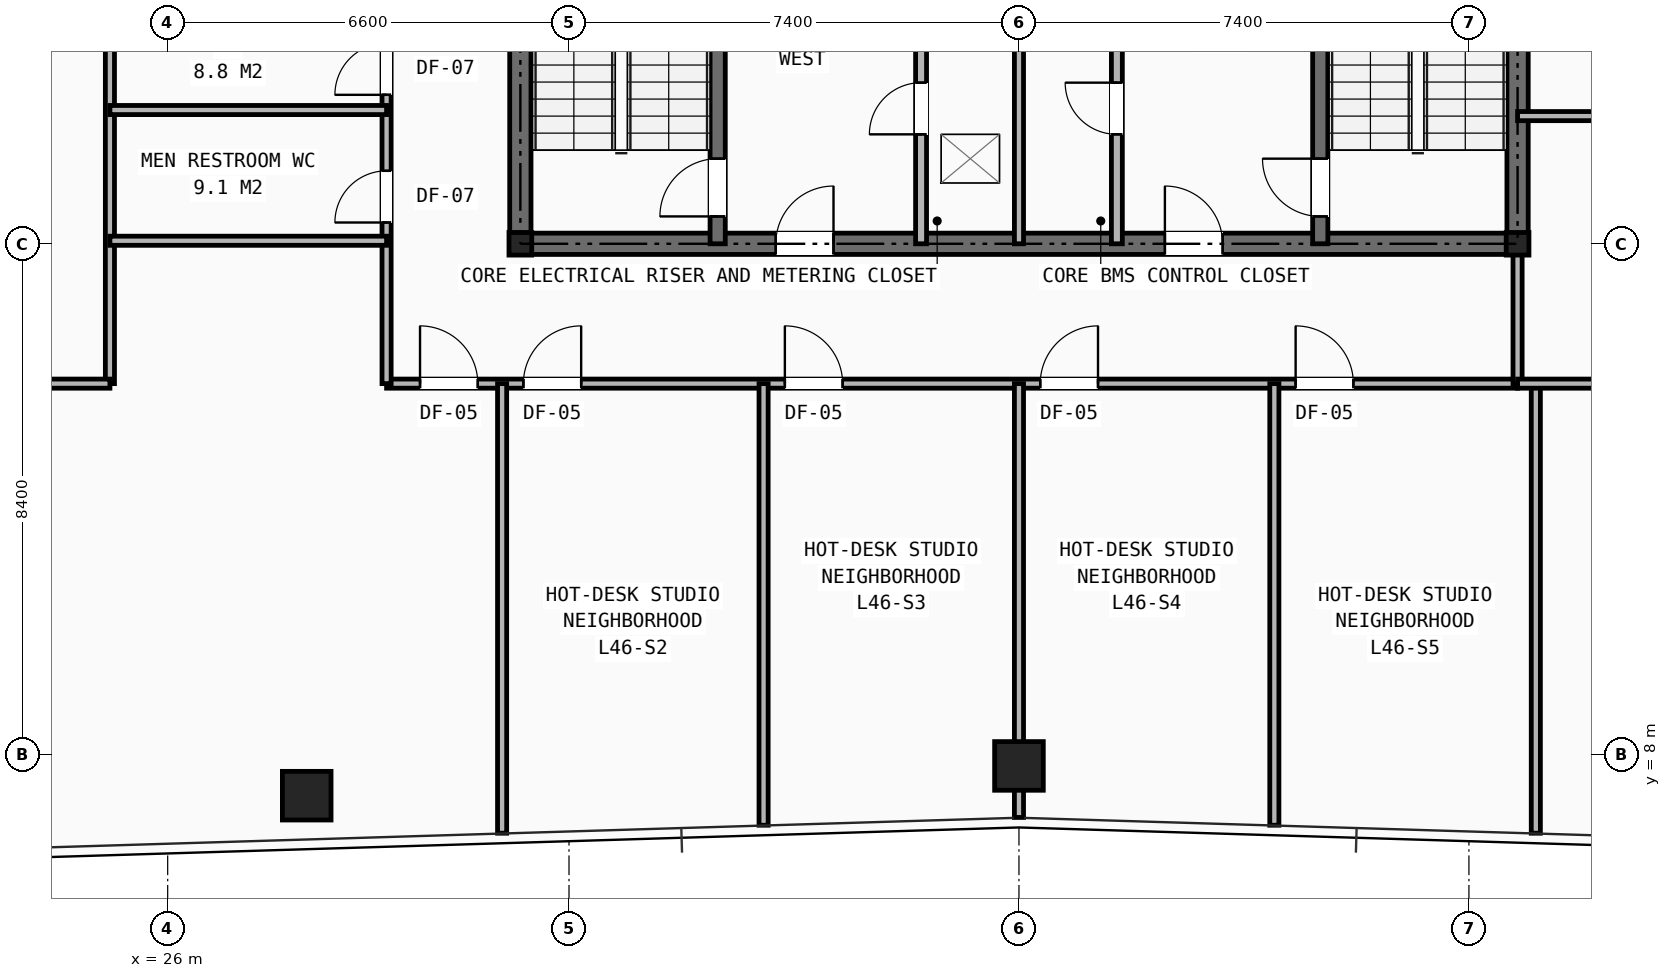
"""IFC4 building model, lengths in metres.
Left out: names, types, materials, properties, quantities, classifications, styles, units other than length and angle.
Written with IfcOpenShell. Run it as: python <this file> out.ifc"""

import sys

from ifc_helpers import new_model, si_unit, direction, frame, frame_2d, origin, origin_2d, place, context, subcontext, project, spatial, rectangle, hollow_rectangle, i_section, extrude, element, fill, save


model = new_model("IFC4")
c1 = context("Model", 3, precision=1e-05, world=origin(), true_north=direction((0.0, 1.0)))
c2 = subcontext(c1, "Body", "Model", "MODEL_VIEW")
j1 = project(units=[si_unit("LENGTHUNIT", "METRE"), si_unit("PLANEANGLEUNIT", "RADIAN")], contexts=[c1])
p1 = place(None, origin())
s1 = spatial("IfcSite", under=j1, at=p1, CompositionType="ELEMENT")
p2 = place(p1, origin())
s2 = spatial("IfcBuilding", under=s1, at=p2, CompositionType="ELEMENT")
p3 = place(p2, frame((0.0, 0.0, 162.0)))
s3 = spatial("IfcBuildingStorey", under=s2, at=p3, CompositionType="ELEMENT", Elevation=162.0)
for number, where, z_axis, x_axis in (
    (1, (31.8, 16.4, 0.0), (0.0, 0.0, 1.0), (1.0, 0.0, 0.0)),
    (2, (48.2, 16.4, 0.0), (0.0, 0.0, 1.0), (1.0, 0.0, 0.0)),
):
    element("IfcColumn", number, at=place(p3, frame(where, z_axis=z_axis, x_axis=x_axis)), inside=s3, PredefinedType="COLUMN", context=c2, shape_type="SweptSolid", body=[
        extrude(i_section(OverallWidth=0.374, OverallDepth=0.372, WebThickness=0.016, FlangeThickness=0.026, at=origin_2d()), origin(), (0.0, 0.0, 1.0), 3.45),
    ])
for number, where, z_axis, x_axis in (
    (3, (28.287, 7.323, 0.0), (0.0, 0.0, 1.0), (1.0, 0.0, 0.0)),
    (4, (40.0, 7.812, 0.0), (0.0, 0.0, 1.0), (1.0, 0.0, 0.0)),
):
    element("IfcColumn", number, at=place(p3, frame(where, z_axis=z_axis, x_axis=x_axis)), inside=s3, PredefinedType="COLUMN", context=c2, shape_type="SweptSolid", body=[
        extrude(hollow_rectangle(XDim=0.8, YDim=0.8, WallThickness=0.055, at=origin_2d()), origin(), (0.0, 0.0, 1.0), 3.45),
    ])
p4 = place(p3, frame((31.8, 16.4, 0.0), z_axis=(0.0, 0.0, 1.0), x_axis=(1.0, 0.0, 0.0)))
e5 = element("IfcWall", 5, at=p4, inside=s3, PredefinedType="SHEAR", context=c2, shape_type="SweptSolid", body=[
    extrude(rectangle(XDim=16.4, YDim=0.35, at=frame_2d((8.2, 0.0))), origin(), (0.0, 0.0, 1.0), 3.21),
])
p5 = place(p4, frame((4.2, 0.0, 0.0)))
e6 = element("IfcOpeningElement", 6, at=p5, cuts=e5, PredefinedType="OPENING", context=c2, shape_type="SweptSolid", body=[
    extrude(rectangle(XDim=0.95, YDim=2.1, at=frame_2d((0.475, 1.05))), frame((0.0, 0.185, 0.0), z_axis=(0.0, -1.0, 0.0), x_axis=(1.0, 0.0, 0.0)), (0.0, 0.0, 1.0), 0.37),
])
p6 = place(p4, frame((10.6, 0.0, 0.0)))
e7 = element("IfcOpeningElement", 7, at=p6, cuts=e5, PredefinedType="OPENING", context=c2, shape_type="SweptSolid", body=[
    extrude(rectangle(XDim=0.95, YDim=2.1, at=frame_2d((0.475, 1.05))), frame((0.0, 0.185, 0.0), z_axis=(0.0, -1.0, 0.0), x_axis=(1.0, 0.0, 0.0)), (0.0, 0.0, 1.0), 0.37),
])
p7 = place(p3, frame((31.8, 16.4, 0.0), z_axis=(0.0, 0.0, 1.0), x_axis=(0.0, 1.0, 0.0)))
e8 = element("IfcWall", 8, at=p7, inside=s3, PredefinedType="SHEAR", context=c2, shape_type="SweptSolid", body=[
    extrude(rectangle(XDim=14.8, YDim=0.35, at=frame_2d((7.4, 0.0))), origin(), (0.0, 0.0, 1.0), 3.21),
])
p8 = place(p7, frame((11.0, 0.0, 0.0)))
e9 = element("IfcOpeningElement", 9, at=p8, cuts=e8, PredefinedType="OPENING", context=c2, shape_type="SweptSolid", body=[
    extrude(rectangle(XDim=1.1, YDim=2.15, at=frame_2d((0.55, 1.075))), frame((0.0, 0.185, 0.0), z_axis=(0.0, -1.0, 0.0), x_axis=(1.0, 0.0, 0.0)), (0.0, 0.0, 1.0), 0.37),
])
p9 = place(p3, frame((48.2, 16.4, 0.0), z_axis=(0.0, 0.0, 1.0), x_axis=(0.0, 1.0, 0.0)))
e10 = element("IfcWall", 10, at=p9, inside=s3, PredefinedType="SHEAR", context=c2, shape_type="SweptSolid", body=[
    extrude(rectangle(XDim=14.8, YDim=0.35, at=frame_2d((7.4, 0.0))), origin(), (0.0, 0.0, 1.0), 3.21),
])
p10 = place(p9, frame((11.0, 0.0, 0.0)))
e11 = element("IfcOpeningElement", 11, at=p10, cuts=e10, PredefinedType="OPENING", context=c2, shape_type="SweptSolid", body=[
    extrude(rectangle(XDim=1.1, YDim=2.15, at=frame_2d((0.55, 1.075))), frame((0.0, 0.185, 0.0), z_axis=(0.0, -1.0, 0.0), x_axis=(1.0, 0.0, 0.0)), (0.0, 0.0, 1.0), 0.37),
])
p11 = place(p3, frame((35.045, 16.4, 0.0), z_axis=(0.0, 0.0, 1.0), x_axis=(0.0, 1.0, 0.0)))
e12 = element("IfcWall", 12, at=p11, inside=s3, PredefinedType="SHEAR", context=c2, shape_type="SweptSolid", body=[
    extrude(rectangle(XDim=8.4, YDim=0.25, at=frame_2d((4.2, 0.0))), origin(), (0.0, 0.0, 1.0), 3.21),
])
p12 = place(p11, frame((0.45, 0.0, 0.0)))
e13 = element("IfcOpeningElement", 13, at=p12, cuts=e12, PredefinedType="OPENING", context=c2, shape_type="SweptSolid", body=[
    extrude(rectangle(XDim=0.95, YDim=2.1, at=frame_2d((0.475, 1.05))), frame((0.0, 0.135, 0.0), z_axis=(0.0, -1.0, 0.0), x_axis=(1.0, 0.0, 0.0)), (0.0, 0.0, 1.0), 0.27),
])
p13 = place(p3, frame((44.955, 16.4, 0.0), z_axis=(0.0, 0.0, 1.0), x_axis=(0.0, 1.0, 0.0)))
e14 = element("IfcWall", 14, at=p13, inside=s3, PredefinedType="SHEAR", context=c2, shape_type="SweptSolid", body=[
    extrude(rectangle(XDim=8.4, YDim=0.25, at=frame_2d((4.2, 0.0))), origin(), (0.0, 0.0, 1.0), 3.21),
])
p14 = place(p13, frame((0.45, 0.0, 0.0)))
e15 = element("IfcOpeningElement", 15, at=p14, cuts=e14, PredefinedType="OPENING", context=c2, shape_type="SweptSolid", body=[
    extrude(rectangle(XDim=0.95, YDim=2.1, at=frame_2d((0.475, 1.05))), frame((0.0, 0.135, 0.0), z_axis=(0.0, -1.0, 0.0), x_axis=(1.0, 0.0, 0.0)), (0.0, 0.0, 1.0), 0.27),
])
p15 = place(p3, frame((38.39, 16.4, 0.0), z_axis=(0.0, 0.0, 1.0), x_axis=(0.0, 1.0, 0.0)))
e16 = element("IfcWall", 16, at=p15, inside=s3, PredefinedType="PARTITIONING", context=c2, shape_type="SweptSolid", body=[
    extrude(rectangle(XDim=8.4, YDim=0.18, at=frame_2d((4.2, 0.0))), origin(), (0.0, 0.0, 1.0), 2.665),
])
p16 = place(p15, frame((1.8, 0.0, 0.0)))
e17 = element("IfcOpeningElement", 17, at=p16, cuts=e16, PredefinedType="OPENING", context=c2, shape_type="SweptSolid", body=[
    extrude(rectangle(XDim=0.85, YDim=2.05, at=frame_2d((0.425, 1.025))), frame((0.0, 0.1, 0.0), z_axis=(0.0, -1.0, 0.0), x_axis=(1.0, 0.0, 0.0)), (0.0, 0.0, 1.0), 0.2),
])
p17 = place(p15, frame((4.35, 0.0, 0.0)))
e18 = element("IfcOpeningElement", 18, at=p17, cuts=e16, PredefinedType="OPENING", context=c2, shape_type="SweptSolid", body=[
    extrude(rectangle(XDim=0.95, YDim=2.1, at=frame_2d((0.475, 1.05))), frame((0.0, 0.1, 0.0), z_axis=(0.0, -1.0, 0.0), x_axis=(1.0, 0.0, 0.0)), (0.0, 0.0, 1.0), 0.2),
])
p18 = place(p3, frame((41.61, 16.4, 0.0), z_axis=(0.0, 0.0, 1.0), x_axis=(0.0, 1.0, 0.0)))
e19 = element("IfcWall", 19, at=p18, inside=s3, PredefinedType="PARTITIONING", context=c2, shape_type="SweptSolid", body=[
    extrude(rectangle(XDim=8.4, YDim=0.18, at=frame_2d((4.2, 0.0))), origin(), (0.0, 0.0, 1.0), 2.665),
])
p19 = place(p18, frame((1.8, 0.0, 0.0)))
e20 = element("IfcOpeningElement", 20, at=p19, cuts=e19, PredefinedType="OPENING", context=c2, shape_type="SweptSolid", body=[
    extrude(rectangle(XDim=0.85, YDim=2.05, at=frame_2d((0.425, 1.025))), frame((0.0, 0.1, 0.0), z_axis=(0.0, -1.0, 0.0), x_axis=(1.0, 0.0, 0.0)), (0.0, 0.0, 1.0), 0.2),
])
p20 = place(p3, frame((40.0, 16.4, 0.0), z_axis=(0.0, 0.0, 1.0), x_axis=(0.0, 1.0, 0.0)))
e21 = element("IfcWall", 21, at=p20, inside=s3, PredefinedType="PARTITIONING", context=c2, shape_type="SweptSolid", body=[
    extrude(rectangle(XDim=3.9, YDim=0.15, at=frame_2d((1.95, 0.0))), origin(), (0.0, 0.0, 1.0), 2.665),
])
p21 = place(p3, frame((29.6, 14.1, 0.0), z_axis=(0.0, 0.0, 1.0), x_axis=(1.0, 0.0, 0.0)))
e22 = element("IfcWall", 22, at=p21, inside=s3, PredefinedType="PARTITIONING", context=c2, shape_type="SweptSolid", body=[
    extrude(rectangle(XDim=18.6, YDim=0.15, at=frame_2d((9.3, 0.0))), origin(), (0.0, 0.0, 1.0), 2.252),
])
p22 = place(p21, frame((0.55, 0.0, 0.0)))
e23 = element("IfcOpeningElement", 23, at=p22, cuts=e22, PredefinedType="OPENING", context=c2, shape_type="SweptSolid", body=[
    extrude(rectangle(XDim=0.95, YDim=2.1, at=frame_2d((0.475, 1.05))), frame((0.0, 0.085, 0.0), z_axis=(0.0, -1.0, 0.0), x_axis=(1.0, 0.0, 0.0)), (0.0, 0.0, 1.0), 0.17),
])
p23 = place(p21, frame((2.25, 0.0, 0.0)))
e24 = element("IfcOpeningElement", 24, at=p23, cuts=e22, PredefinedType="OPENING", context=c2, shape_type="SweptSolid", body=[
    extrude(rectangle(XDim=0.95, YDim=2.1, at=frame_2d((0.475, 1.05))), frame((0.0, 0.085, 0.0), z_axis=(0.0, -1.0, 0.0), x_axis=(1.0, 0.0, 0.0)), (0.0, 0.0, 1.0), 0.17),
])
p24 = place(p21, frame((6.55, 0.0, 0.0)))
e25 = element("IfcOpeningElement", 25, at=p24, cuts=e22, PredefinedType="OPENING", context=c2, shape_type="SweptSolid", body=[
    extrude(rectangle(XDim=0.95, YDim=2.1, at=frame_2d((0.475, 1.05))), frame((0.0, 0.085, 0.0), z_axis=(0.0, -1.0, 0.0), x_axis=(1.0, 0.0, 0.0)), (0.0, 0.0, 1.0), 0.17),
])
p25 = place(p21, frame((10.75, 0.0, 0.0)))
e26 = element("IfcOpeningElement", 26, at=p25, cuts=e22, PredefinedType="OPENING", context=c2, shape_type="SweptSolid", body=[
    extrude(rectangle(XDim=0.95, YDim=2.1, at=frame_2d((0.475, 1.05))), frame((0.0, 0.085, 0.0), z_axis=(0.0, -1.0, 0.0), x_axis=(1.0, 0.0, 0.0)), (0.0, 0.0, 1.0), 0.17),
])
p26 = place(p21, frame((14.95, 0.0, 0.0)))
e27 = element("IfcOpeningElement", 27, at=p26, cuts=e22, PredefinedType="OPENING", context=c2, shape_type="SweptSolid", body=[
    extrude(rectangle(XDim=0.95, YDim=2.1, at=frame_2d((0.475, 1.05))), frame((0.0, 0.085, 0.0), z_axis=(0.0, -1.0, 0.0), x_axis=(1.0, 0.0, 0.0)), (0.0, 0.0, 1.0), 0.17),
])
p27 = place(p3, frame((48.2, 14.1, 0.0), z_axis=(0.0, 0.0, 1.0), x_axis=(0.0, 1.0, 0.0)))
e28 = element("IfcWall", 28, at=p27, inside=s3, PredefinedType="PARTITIONING", context=c2, shape_type="SweptSolid", body=[
    extrude(rectangle(XDim=2.3, YDim=0.15, at=frame_2d((1.15, 0.0))), origin(), (0.0, 0.0, 1.0), 2.665),
])
p28 = place(p3, frame((29.6, 14.1, 0.0), z_axis=(0.0, 0.0, 1.0), x_axis=(0.0, 1.0, 0.0)))
e29 = element("IfcWall", 29, at=p28, inside=s3, PredefinedType="PARTITIONING", context=c2, shape_type="SweptSolid", body=[
    extrude(rectangle(XDim=8.7, YDim=0.15, at=frame_2d((4.35, 0.0))), origin(), (0.0, 0.0, 1.0), 3.21),
])
p29 = place(p28, frame((2.65, 0.0, 0.0)))
e30 = element("IfcOpeningElement", 30, at=p29, cuts=e29, PredefinedType="OPENING", context=c2, shape_type="SweptSolid", body=[
    extrude(rectangle(XDim=0.85, YDim=2.05, at=frame_2d((0.425, 1.025))), frame((0.0, 0.085, 0.0), z_axis=(0.0, -1.0, 0.0), x_axis=(1.0, 0.0, 0.0)), (0.0, 0.0, 1.0), 0.17),
])
p30 = place(p28, frame((4.75, 0.0, 0.0)))
e31 = element("IfcOpeningElement", 31, at=p30, cuts=e29, PredefinedType="OPENING", context=c2, shape_type="SweptSolid", body=[
    extrude(rectangle(XDim=0.85, YDim=2.05, at=frame_2d((0.425, 1.025))), frame((0.0, 0.085, 0.0), z_axis=(0.0, -1.0, 0.0), x_axis=(1.0, 0.0, 0.0)), (0.0, 0.0, 1.0), 0.17),
])
p31 = place(p28, frame((6.85, 0.0, 0.0)))
e32 = element("IfcOpeningElement", 32, at=p31, cuts=e29, PredefinedType="OPENING", context=c2, shape_type="SweptSolid", body=[
    extrude(rectangle(XDim=0.85, YDim=2.05, at=frame_2d((0.425, 1.025))), frame((0.0, 0.085, 0.0), z_axis=(0.0, -1.0, 0.0), x_axis=(1.0, 0.0, 0.0)), (0.0, 0.0, 1.0), 0.17),
])
p32 = place(p3, frame((25.05, 14.1, 0.0), z_axis=(0.0, 0.0, 1.0), x_axis=(0.0, 1.0, 0.0)))
e33 = element("IfcWall", 33, at=p32, inside=s3, PredefinedType="PARTITIONING", context=c2, shape_type="SweptSolid", body=[
    extrude(rectangle(XDim=8.7, YDim=0.15, at=frame_2d((4.35, 0.0))), origin(), (0.0, 0.0, 1.0), 3.21),
])
for number, where, z_axis, x_axis in (
    (34, (25.05, 16.45, 0.0), (0.0, 0.0, 1.0), (1.0, 0.0, 0.0)),
    (35, (25.05, 18.6, 0.0), (0.0, 0.0, 1.0), (1.0, 0.0, 0.0)),
):
    element("IfcWall", number, at=place(p3, frame(where, z_axis=z_axis, x_axis=x_axis)), inside=s3, PredefinedType="PARTITIONING", context=c2, shape_type="SweptSolid", body=[
        extrude(rectangle(XDim=4.55, YDim=0.15, at=frame_2d((2.275, 0.0))), origin(), (0.0, 0.0, 1.0), 3.21),
    ])
p33 = place(p3, frame((31.5, 6.706, 0.0), z_axis=(0.0, 0.0, 1.0), x_axis=(0.0, 1.0, 0.0)))
e36 = element("IfcWall", 36, at=p33, inside=s3, PredefinedType="PARTITIONING", context=c2, shape_type="SweptSolid", body=[
    extrude(rectangle(XDim=7.394, YDim=0.15, at=frame_2d((3.697, 0.0))), origin(), (0.0, 0.0, 1.0), 2.589),
])
p34 = place(p3, frame((35.8, 6.837, 0.0), z_axis=(0.0, 0.0, 1.0), x_axis=(0.0, 1.0, 0.0)))
e37 = element("IfcWall", 37, at=p34, inside=s3, PredefinedType="PARTITIONING", context=c2, shape_type="SweptSolid", body=[
    extrude(rectangle(XDim=7.263, YDim=0.15, at=frame_2d((3.631, 0.0))), origin(), (0.0, 0.0, 1.0), 2.252),
])
p35 = place(p3, frame((40.0, 6.965, 0.0), z_axis=(0.0, 0.0, 1.0), x_axis=(0.0, 1.0, 0.0)))
e38 = element("IfcWall", 38, at=p35, inside=s3, PredefinedType="PARTITIONING", context=c2, shape_type="SweptSolid", body=[
    extrude(rectangle(XDim=7.135, YDim=0.15, at=frame_2d((3.567, 0.0))), origin(), (0.0, 0.0, 1.0), 2.252),
])
p36 = place(p3, frame((44.2, 6.837, 0.0), z_axis=(0.0, 0.0, 1.0), x_axis=(0.0, 1.0, 0.0)))
e39 = element("IfcWall", 39, at=p36, inside=s3, PredefinedType="PARTITIONING", context=c2, shape_type="SweptSolid", body=[
    extrude(rectangle(XDim=7.263, YDim=0.15, at=frame_2d((3.631, 0.0))), origin(), (0.0, 0.0, 1.0), 2.589),
])
p37 = place(p3, frame((48.5, 6.706, 0.0), z_axis=(0.0, 0.0, 1.0), x_axis=(0.0, 1.0, 0.0)))
e40 = element("IfcWall", 40, at=p37, inside=s3, PredefinedType="PARTITIONING", context=c2, shape_type="SweptSolid", body=[
    extrude(rectangle(XDim=7.394, YDim=0.15, at=frame_2d((3.697, 0.0))), origin(), (0.0, 0.0, 1.0), 2.589),
])
p38 = place(p3, frame((13.492, 14.1, 0.0), z_axis=(0.0, 0.0, 1.0), x_axis=(1.0, 0.0, 0.0)))
e41 = element("IfcWall", 41, at=p38, inside=s3, PredefinedType="PARTITIONING", context=c2, shape_type="SweptSolid", body=[
    extrude(rectangle(XDim=11.558, YDim=0.15, at=frame_2d((5.779, 0.0))), origin(), (0.0, 0.0, 1.0), 2.589),
])
p39 = place(p3, frame((48.2, 14.1, 0.0), z_axis=(0.0, 0.0, 1.0), x_axis=(1.0, 0.0, 0.0)))
e42 = element("IfcWall", 42, at=p39, inside=s3, PredefinedType="PARTITIONING", context=c2, shape_type="SweptSolid", body=[
    extrude(rectangle(XDim=18.308, YDim=0.15, at=frame_2d((9.154, 0.0))), origin(), (0.0, 0.0, 1.0), 2.589),
])
p40 = place(p3, frame((48.2, 18.5, 0.0), z_axis=(0.0, 0.0, 1.0), x_axis=(1.0, 0.0, 0.0)))
e43 = element("IfcWall", 43, at=p40, inside=s3, PredefinedType="PARTITIONING", context=c2, shape_type="SweptSolid", body=[
    extrude(rectangle(XDim=15.585, YDim=0.15, at=frame_2d((7.792, 0.0))), origin(), (0.0, 0.0, 1.0), 2.589),
])
p41 = place(p40, frame((1.4, 0.0, 0.0)))
e44 = element("IfcOpeningElement", 44, at=p41, cuts=e43, PredefinedType="OPENING", context=c2, shape_type="SweptSolid", body=[
    extrude(rectangle(XDim=0.95, YDim=2.1, at=frame_2d((0.475, 1.05))), frame((0.0, 0.085, 0.0), z_axis=(0.0, -1.0, 0.0), x_axis=(1.0, 0.0, 0.0)), (0.0, 0.0, 1.0), 0.17),
])
p42 = place(p16, origin())
e45 = element("IfcDoor", 45, at=p42, inside=s3, OperationType="SINGLE_SWING_LEFT", PredefinedType="DOOR", context=c2, shape_type="SweptSolid", body=[
    extrude(rectangle(XDim=0.85, YDim=2.05, at=frame_2d((0.425, 1.025))), frame((0.0, 0.025, 0.0), z_axis=(0.0, -1.0, 0.0), x_axis=(1.0, 0.0, 0.0)), (0.0, 0.0, 1.0), 0.05),
])
fill(e17, e45)
p43 = place(p19, origin())
e46 = element("IfcDoor", 46, at=p43, inside=s3, OperationType="SINGLE_SWING_RIGHT", PredefinedType="DOOR", context=c2, shape_type="SweptSolid", body=[
    extrude(rectangle(XDim=0.85, YDim=2.05, at=frame_2d((0.425, 1.025))), frame((0.0, 0.025, 0.0), z_axis=(0.0, -1.0, 0.0), x_axis=(1.0, 0.0, 0.0)), (0.0, 0.0, 1.0), 0.05),
])
fill(e20, e46)
p44 = place(p12, origin())
e47 = element("IfcDoor", 47, at=p44, inside=s3, OperationType="SINGLE_SWING_LEFT", PredefinedType="DOOR", context=c2, shape_type="SweptSolid", body=[
    extrude(rectangle(XDim=0.95, YDim=2.1, at=frame_2d((0.475, 1.05))), frame((0.0, 0.025, 0.0), z_axis=(0.0, -1.0, 0.0), x_axis=(1.0, 0.0, 0.0)), (0.0, 0.0, 1.0), 0.05),
])
fill(e13, e47)
p45 = place(p14, origin())
e48 = element("IfcDoor", 48, at=p45, inside=s3, OperationType="SINGLE_SWING_RIGHT", PredefinedType="DOOR", context=c2, shape_type="SweptSolid", body=[
    extrude(rectangle(XDim=0.95, YDim=2.1, at=frame_2d((0.475, 1.05))), frame((0.0, 0.025, 0.0), z_axis=(0.0, -1.0, 0.0), x_axis=(1.0, 0.0, 0.0)), (0.0, 0.0, 1.0), 0.05),
])
fill(e15, e48)
p46 = place(p5, origin())
e49 = element("IfcDoor", 49, at=p46, inside=s3, OperationType="SINGLE_SWING_RIGHT", PredefinedType="DOOR", context=c2, shape_type="SweptSolid", body=[
    extrude(rectangle(XDim=0.95, YDim=2.1, at=frame_2d((0.475, 1.05))), frame((0.0, 0.025, 0.0), z_axis=(0.0, -1.0, 0.0), x_axis=(1.0, 0.0, 0.0)), (0.0, 0.0, 1.0), 0.05),
])
fill(e6, e49)
p47 = place(p6, origin())
e50 = element("IfcDoor", 50, at=p47, inside=s3, OperationType="SINGLE_SWING_LEFT", PredefinedType="DOOR", context=c2, shape_type="SweptSolid", body=[
    extrude(rectangle(XDim=0.95, YDim=2.1, at=frame_2d((0.475, 1.05))), frame((0.0, 0.025, 0.0), z_axis=(0.0, -1.0, 0.0), x_axis=(1.0, 0.0, 0.0)), (0.0, 0.0, 1.0), 0.05),
])
fill(e7, e50)
p48 = place(p29, origin())
e51 = element("IfcDoor", 51, at=p48, inside=s3, OperationType="SINGLE_SWING_LEFT", PredefinedType="DOOR", context=c2, shape_type="SweptSolid", body=[
    extrude(rectangle(XDim=0.85, YDim=2.05, at=frame_2d((0.425, 1.025))), frame((0.0, 0.025, 0.0), z_axis=(0.0, -1.0, 0.0), x_axis=(1.0, 0.0, 0.0)), (0.0, 0.0, 1.0), 0.05),
])
fill(e30, e51)
p49 = place(p30, origin())
e52 = element("IfcDoor", 52, at=p49, inside=s3, OperationType="SINGLE_SWING_LEFT", PredefinedType="DOOR", context=c2, shape_type="SweptSolid", body=[
    extrude(rectangle(XDim=0.85, YDim=2.05, at=frame_2d((0.425, 1.025))), frame((0.0, 0.025, 0.0), z_axis=(0.0, -1.0, 0.0), x_axis=(1.0, 0.0, 0.0)), (0.0, 0.0, 1.0), 0.05),
])
fill(e31, e52)
p50 = place(p22, origin())
e53 = element("IfcDoor", 53, at=p50, inside=s3, OperationType="SINGLE_SWING_LEFT", PredefinedType="DOOR", context=c2, shape_type="SweptSolid", body=[
    extrude(rectangle(XDim=0.95, YDim=2.1, at=frame_2d((0.475, 1.05))), frame((0.0, 0.025, 0.0), z_axis=(0.0, -1.0, 0.0), x_axis=(1.0, 0.0, 0.0)), (0.0, 0.0, 1.0), 0.05),
])
fill(e23, e53)
p51 = place(p23, origin())
e54 = element("IfcDoor", 54, at=p51, inside=s3, OperationType="SINGLE_SWING_RIGHT", PredefinedType="DOOR", context=c2, shape_type="SweptSolid", body=[
    extrude(rectangle(XDim=0.95, YDim=2.1, at=frame_2d((0.475, 1.05))), frame((0.0, 0.025, 0.0), z_axis=(0.0, -1.0, 0.0), x_axis=(1.0, 0.0, 0.0)), (0.0, 0.0, 1.0), 0.05),
])
fill(e24, e54)
p52 = place(p24, origin())
e55 = element("IfcDoor", 55, at=p52, inside=s3, OperationType="SINGLE_SWING_LEFT", PredefinedType="DOOR", context=c2, shape_type="SweptSolid", body=[
    extrude(rectangle(XDim=0.95, YDim=2.1, at=frame_2d((0.475, 1.05))), frame((0.0, 0.025, 0.0), z_axis=(0.0, -1.0, 0.0), x_axis=(1.0, 0.0, 0.0)), (0.0, 0.0, 1.0), 0.05),
])
fill(e25, e55)
p53 = place(p25, origin())
e56 = element("IfcDoor", 56, at=p53, inside=s3, OperationType="SINGLE_SWING_RIGHT", PredefinedType="DOOR", context=c2, shape_type="SweptSolid", body=[
    extrude(rectangle(XDim=0.95, YDim=2.1, at=frame_2d((0.475, 1.05))), frame((0.0, 0.025, 0.0), z_axis=(0.0, -1.0, 0.0), x_axis=(1.0, 0.0, 0.0)), (0.0, 0.0, 1.0), 0.05),
])
fill(e26, e56)
p54 = place(p26, origin())
e57 = element("IfcDoor", 57, at=p54, inside=s3, OperationType="SINGLE_SWING_LEFT", PredefinedType="DOOR", context=c2, shape_type="SweptSolid", body=[
    extrude(rectangle(XDim=0.95, YDim=2.1, at=frame_2d((0.475, 1.05))), frame((0.0, 0.025, 0.0), z_axis=(0.0, -1.0, 0.0), x_axis=(1.0, 0.0, 0.0)), (0.0, 0.0, 1.0), 0.05),
])
fill(e27, e57)
save(model, sys.argv[1])
